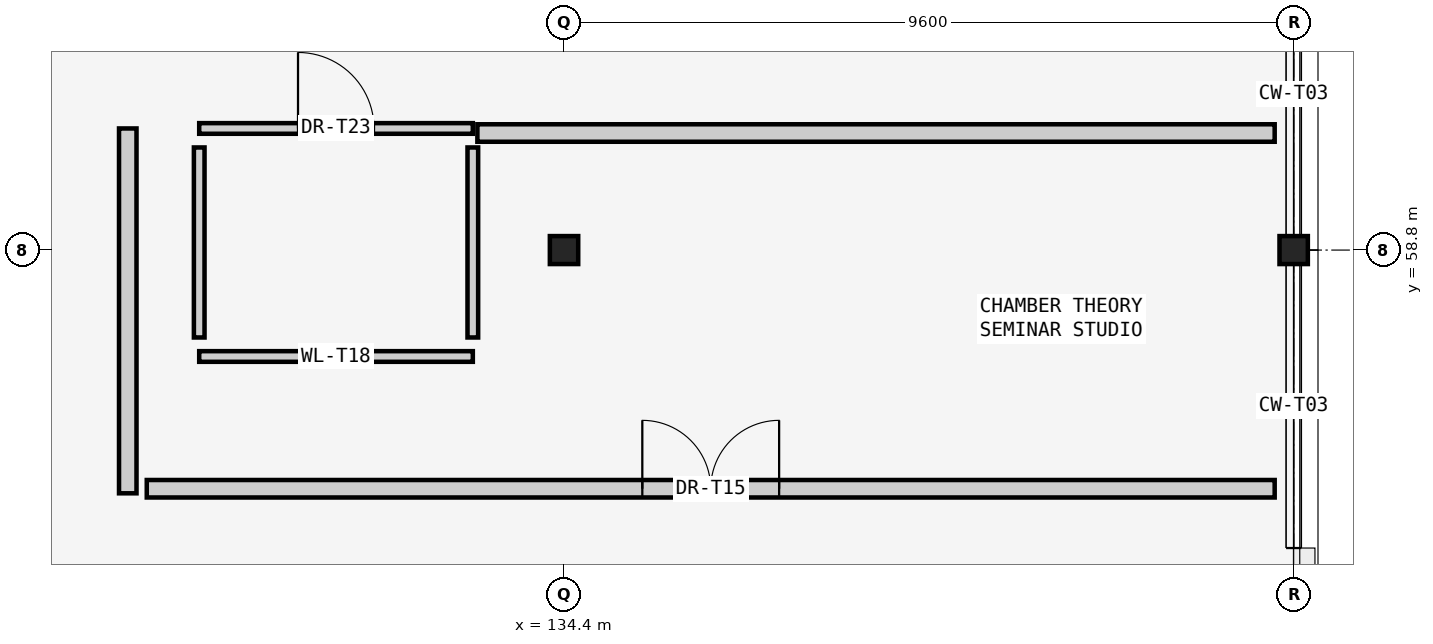
"""IFC4 building model, lengths in metres.
Left out: names, types, materials, properties, quantities, classifications, styles, units other than length and angle.
Written with IfcOpenShell. Run it as: python <this file> out.ifc"""

import sys

from ifc_helpers import new_model, si_unit, direction, frame, frame_2d, origin, origin_2d, place, context, subcontext, project, spatial, rectangle, i_section, extrude, element, fill, save


model = new_model("IFC4")
c1 = context("Model", 3, precision=1e-05, world=origin(), true_north=direction((0.0, 1.0)))
c2 = subcontext(c1, "Body", "Model", "MODEL_VIEW")
j1 = project(units=[si_unit("LENGTHUNIT", "METRE"), si_unit("PLANEANGLEUNIT", "RADIAN")], contexts=[c1])
p1 = place(None, origin())
s1 = spatial("IfcSite", under=j1, at=p1, CompositionType="ELEMENT")
p2 = place(p1, origin())
s2 = spatial("IfcBuilding", under=s1, at=p2, CompositionType="ELEMENT")
p3 = place(p2, frame((0.0, 0.0, 15.0)))
s3 = spatial("IfcBuildingStorey", under=s2, at=p3, CompositionType="ELEMENT", Elevation=15.0)
for number, where, z_axis, x_axis in (
    (1, (134.4, 58.8, 0.0), (0.0, 0.0, 1.0), (1.0, 0.0, 0.0)),
    (2, (144.0, 58.8, 0.0), (0.0, 0.0, 1.0), (1.0, 0.0, 0.0)),
):
    element("IfcColumn", number, at=place(p3, frame(where, z_axis=z_axis, x_axis=x_axis)), inside=s3, PredefinedType="COLUMN", context=c2, shape_type="SweptSolid", body=[
        extrude(i_section(OverallWidth=0.373, OverallDepth=0.368, WebThickness=0.018, FlangeThickness=0.028, at=origin_2d()), origin(), (0.0, 0.0, 1.0), 4.58),
    ])
p4 = place(p3, frame((129.6, 57.4, 0.0), z_axis=(0.0, 0.0, 1.0), x_axis=(1.0, 0.0, 0.0)))
e3 = element("IfcWall", 3, at=p4, inside=s3, PredefinedType="PARTITIONING", context=c2, shape_type="SweptSolid", body=[
    extrude(rectangle(XDim=3.6, YDim=0.14, at=frame_2d((1.8, 0.0))), origin(), (0.0, 0.0, 1.0), 4.32),
])
p5 = place(p3, frame((129.6, 60.4, 0.0), z_axis=(0.0, 0.0, 1.0), x_axis=(1.0, 0.0, 0.0)))
e4 = element("IfcWall", 4, at=p5, inside=s3, PredefinedType="PARTITIONING", context=c2, shape_type="SweptSolid", body=[
    extrude(rectangle(XDim=3.6, YDim=0.14, at=frame_2d((1.8, 0.0))), origin(), (0.0, 0.0, 1.0), 4.32),
])
p6 = place(p5, frame((1.3, 0.0, 0.0)))
e5 = element("IfcOpeningElement", 5, at=p6, cuts=e4, PredefinedType="OPENING", context=c2, shape_type="SweptSolid", body=[
    extrude(rectangle(XDim=1.0, YDim=2.15, at=frame_2d((0.5, 1.075))), frame((0.0, 0.08, 0.0), z_axis=(0.0, -1.0, 0.0), x_axis=(1.0, 0.0, 0.0)), (0.0, 0.0, 1.0), 0.16),
])
for number, where, z_axis, x_axis in (
    (6, (129.6, 57.65, 0.0), (0.0, 0.0, 1.0), (0.0, 1.0, 0.0)),
    (7, (133.2, 57.65, 0.0), (0.0, 0.0, 1.0), (0.0, 1.0, 0.0)),
):
    element("IfcWall", number, at=place(p3, frame(where, z_axis=z_axis, x_axis=x_axis)), inside=s3, PredefinedType="PARTITIONING", context=c2, shape_type="SweptSolid", body=[
        extrude(rectangle(XDim=2.5, YDim=0.14, at=frame_2d((1.25, 0.0))), origin(), (0.0, 0.0, 1.0), 4.32),
    ])
p7 = place(p3, frame((133.26, 60.34, 0.0), z_axis=(0.0, 0.0, 1.0), x_axis=(1.0, 0.0, 0.0)))
e8 = element("IfcWall", 8, at=p7, inside=s3, PredefinedType="SOLIDWALL", context=c2, shape_type="SweptSolid", body=[
    extrude(rectangle(XDim=10.49, YDim=0.23, at=frame_2d((5.245, 0.0))), origin(), (0.0, 0.0, 1.0), 4.45),
])
p8 = place(p3, frame((128.66, 55.6, 0.0), z_axis=(0.0, 0.0, 1.0), x_axis=(0.0, 1.0, 0.0)))
e9 = element("IfcWall", 9, at=p8, inside=s3, PredefinedType="SOLIDWALL", context=c2, shape_type="SweptSolid", body=[
    extrude(rectangle(XDim=4.8, YDim=0.23, at=frame_2d((2.4, 0.0))), origin(), (0.0, 0.0, 1.0), 4.45),
])
p9 = place(p3, frame((128.91, 55.66, 0.0), z_axis=(0.0, 0.0, 1.0), x_axis=(1.0, 0.0, 0.0)))
e10 = element("IfcWall", 10, at=p9, inside=s3, PredefinedType="SOLIDWALL", context=c2, shape_type="SweptSolid", body=[
    extrude(rectangle(XDim=14.84, YDim=0.23, at=frame_2d((7.42, 0.0))), origin(), (0.0, 0.0, 1.0), 4.45),
])
p10 = place(p9, frame((6.52, 0.0, 0.0)))
e11 = element("IfcOpeningElement", 11, at=p10, cuts=e10, PredefinedType="OPENING", context=c2, shape_type="SweptSolid", body=[
    extrude(rectangle(XDim=1.8, YDim=2.3, at=frame_2d((0.9, 1.15))), frame((0.0, 0.125, 0.0), z_axis=(0.0, -1.0, 0.0), x_axis=(1.0, 0.0, 0.0)), (0.0, 0.0, 1.0), 0.25),
])
p11 = place(p6, origin())
e12 = element("IfcDoor", 12, at=p11, inside=s3, OperationType="SINGLE_SWING_LEFT", PredefinedType="DOOR", context=c2, shape_type="SweptSolid", body=[
    extrude(rectangle(XDim=1.0, YDim=2.15, at=frame_2d((0.5, 1.075))), frame((0.0, 0.025, 0.0), z_axis=(0.0, -1.0, 0.0), x_axis=(1.0, 0.0, 0.0)), (0.0, 0.0, 1.0), 0.05),
])
fill(e5, e12)
p12 = place(p10, origin())
e13 = element("IfcDoor", 13, at=p12, inside=s3, OperationType="DOUBLE_SWING_LEFT", PredefinedType="DOOR", context=c2, shape_type="SweptSolid", body=[
    extrude(rectangle(XDim=1.8, YDim=2.3, at=frame_2d((0.9, 1.15))), frame((0.0, 0.025, 0.0), z_axis=(0.0, -1.0, 0.0), x_axis=(1.0, 0.0, 0.0)), (0.0, 0.0, 1.0), 0.05),
])
fill(e11, e13)
save(model, sys.argv[1])
